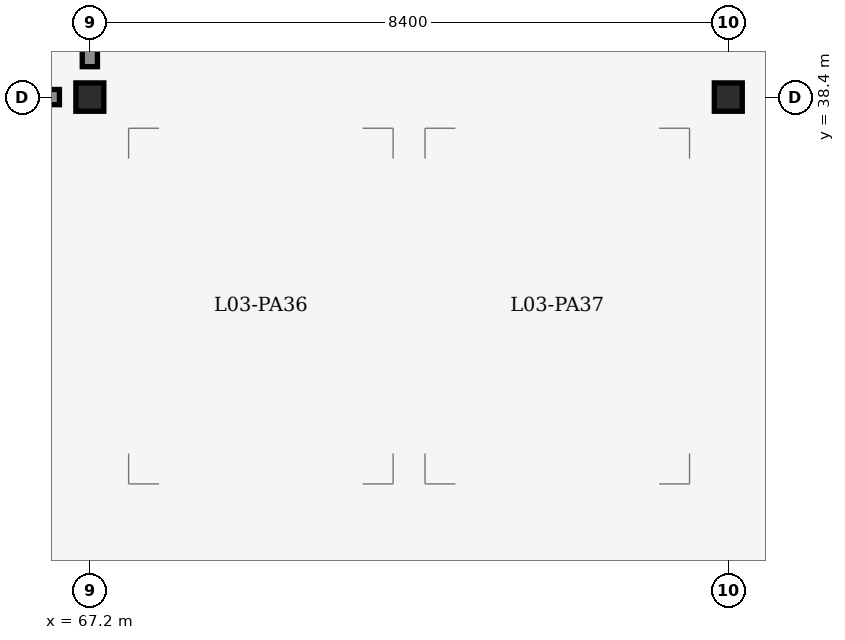
"""IFC4 building model, lengths in metres.
Left out: names, types, materials, properties, quantities, classifications, styles, units other than length and angle.
Written with IfcOpenShell. Run it as: python <this file> out.ifc"""

import sys

from ifc_helpers import new_model, si_unit, direction, frame, frame_2d, origin, origin_2d, place, context, subcontext, project, spatial, rectangle, i_section, extrude, element, save


model = new_model("IFC4")
c1 = context("Model", 3, precision=1e-05, world=origin(), true_north=direction((0.0, 1.0)))
c2 = subcontext(c1, "Body", "Model", "MODEL_VIEW")
j1 = project(units=[si_unit("LENGTHUNIT", "METRE"), si_unit("PLANEANGLEUNIT", "RADIAN")], contexts=[c1])
p1 = place(None, origin())
s1 = spatial("IfcSite", under=j1, at=p1, CompositionType="ELEMENT")
p2 = place(p1, origin())
s2 = spatial("IfcBuilding", under=s1, at=p2, CompositionType="ELEMENT")
p3 = place(p2, frame((0.0, 0.0, 12.6)))
s3 = spatial("IfcBuildingStorey", under=s2, at=p3, CompositionType="ELEMENT", Elevation=12.6)
for number, where, z_axis, x_axis in (
    (1, (67.2, 38.4, 0.0), (0.0, 0.0, 1.0), (1.0, 0.0, 0.0)),
    (2, (75.6, 38.4, 0.0), (0.0, 0.0, 1.0), (1.0, 0.0, 0.0)),
):
    element("IfcColumn", number, at=place(p3, frame(where, z_axis=z_axis, x_axis=x_axis)), inside=s3, PredefinedType="COLUMN", context=c2, shape_type="SweptSolid", body=[
        extrude(i_section(OverallWidth=0.373, OverallDepth=0.368, WebThickness=0.014, FlangeThickness=0.024, FilletRadius=0.015, at=origin_2d()), origin(), (0.0, 0.0, 1.0), 3.6),
    ])
p4 = place(p3, frame((59.2, 38.4, 0.0), z_axis=(0.0, 0.0, 1.0), x_axis=(1.0, 0.0, 0.0)))
e3 = element("IfcWall", 3, at=p4, inside=s3, PredefinedType="PARTITIONING", context=c2, shape_type="SweptSolid", body=[
    extrude(rectangle(XDim=7.6, YDim=0.2, at=frame_2d((3.8, 0.0))), origin(), (0.0, 0.0, 1.0), 2.525),
])
p5 = place(p4, frame((3.2, 0.0, 0.0)))
e4 = element("IfcOpeningElement", 4, at=p5, cuts=e3, PredefinedType="OPENING", context=c2, shape_type="SweptSolid", body=[
    extrude(rectangle(XDim=0.92, YDim=2.1, at=frame_2d((0.46, 1.05))), frame((0.0, 0.11, 0.0), z_axis=(0.0, -1.0, 0.0), x_axis=(1.0, 0.0, 0.0)), (0.0, 0.0, 1.0), 0.22),
])
p6 = place(p3, frame((67.2, 38.8, 0.0), z_axis=(0.0, 0.0, 1.0), x_axis=(0.0, 1.0, 0.0)))
e5 = element("IfcWall", 5, at=p6, inside=s3, PredefinedType="PARTITIONING", context=c2, shape_type="SweptSolid", body=[
    extrude(rectangle(XDim=7.6, YDim=0.2, at=frame_2d((3.8, 0.0))), origin(), (0.0, 0.0, 1.0), 2.525),
])
save(model, sys.argv[1])
